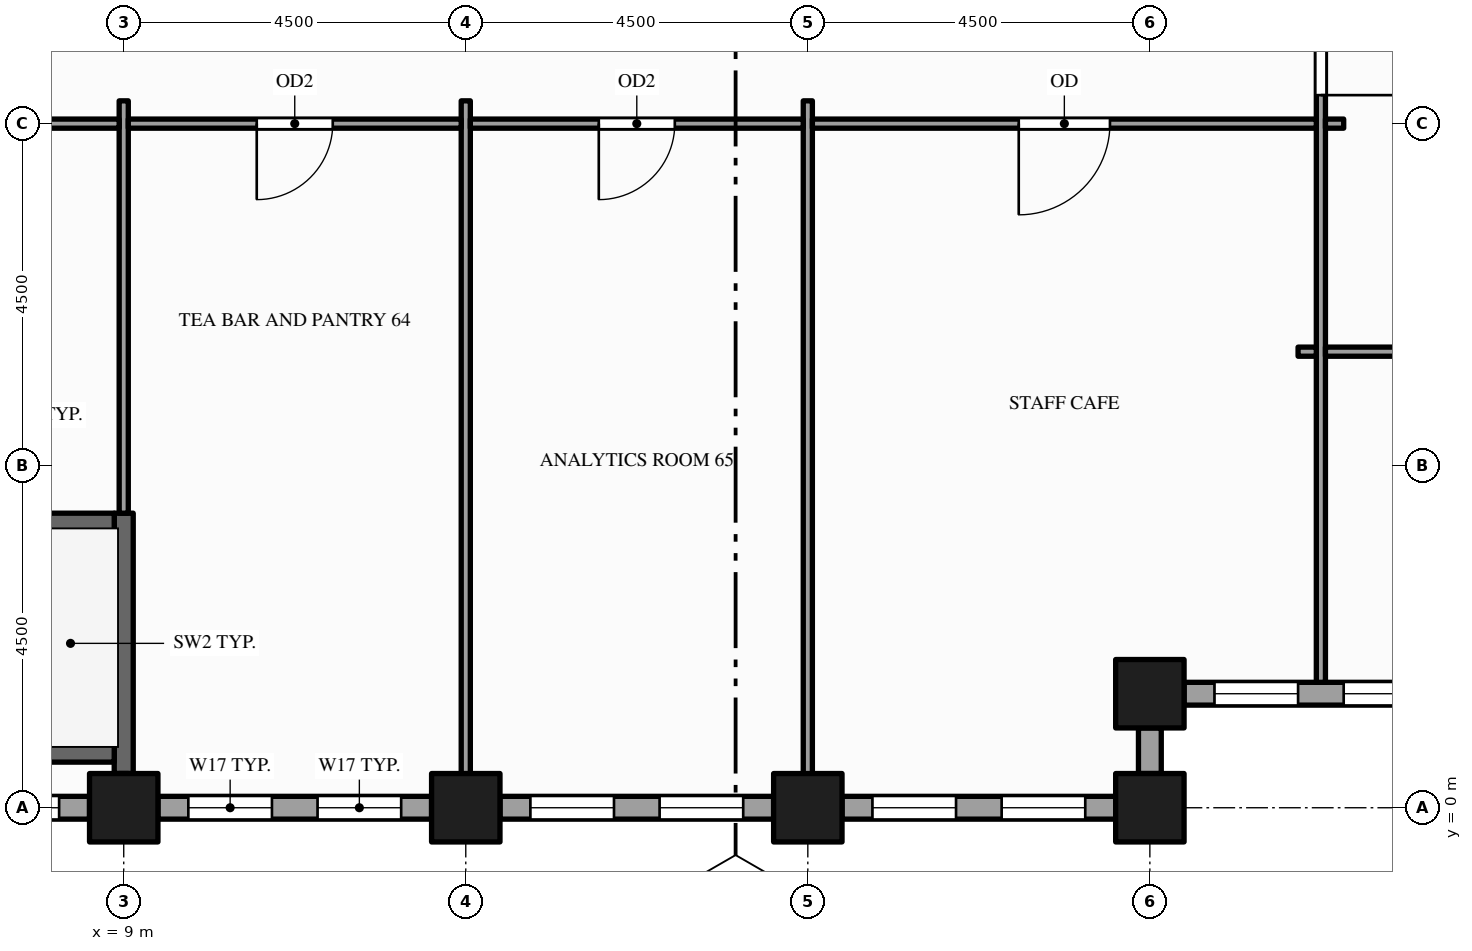
"""IFC4 building model, lengths in metres.
Left out: names, types, materials, properties, quantities, classifications, styles, units other than length and angle.
Written with IfcOpenShell. Run it as: python <this file> out.ifc"""

import sys

from ifc_helpers import new_model, si_unit, direction, frame, frame_2d, origin, origin_2d, place, context, subcontext, project, spatial, rectangle, hollow_rectangle, extrude, element, fill, save


model = new_model("IFC4")
c1 = context("Model", 3, precision=1e-05, world=origin(), true_north=direction((0.0, 1.0)))
c2 = subcontext(c1, "Body", "Model", "MODEL_VIEW")
j1 = project(units=[si_unit("LENGTHUNIT", "METRE"), si_unit("PLANEANGLEUNIT", "RADIAN")], contexts=[c1])
p1 = place(None, origin())
s1 = spatial("IfcSite", under=j1, at=p1, CompositionType="ELEMENT")
p2 = place(p1, origin())
s2 = spatial("IfcBuilding", under=s1, at=p2, CompositionType="ELEMENT")
p3 = place(p2, frame((0.0, 0.0, 159.0)))
s3 = spatial("IfcBuildingStorey", under=s2, at=p3, CompositionType="ELEMENT", Elevation=159.0)
for number, where, z_axis, x_axis in (
    (1, (9.0, 0.0, -0.15), (0.0, 0.0, 1.0), (1.0, 0.0, 0.0)),
    (2, (13.5, 0.0, -0.15), (0.0, 0.0, 1.0), (1.0, 0.0, 0.0)),
    (3, (18.0, 0.0, -0.15), (0.0, 0.0, 1.0), (1.0, 0.0, 0.0)),
    (4, (22.5, 0.0, -0.15), (0.0, 0.0, 1.0), (1.0, 0.0, 0.0)),
    (5, (22.5, 1.5, -0.15), (0.0, 0.0, 1.0), (1.0, 0.0, 0.0)),
):
    element("IfcColumn", number, at=place(p3, frame(where, z_axis=z_axis, x_axis=x_axis)), inside=s3, PredefinedType="COLUMN", context=c2, shape_type="SweptSolid", body=[
        extrude(hollow_rectangle(XDim=0.9, YDim=0.9, WallThickness=0.045, at=origin_2d()), origin(), (0.0, 0.0, 1.0), 4.0),
    ])
p4 = place(p3, frame((4.95, 0.0, 0.0), z_axis=(0.0, 0.0, 1.0), x_axis=(1.0, 0.0, 0.0)))
e6 = element("IfcWall", 6, at=p4, inside=s3, PredefinedType="STANDARD", context=c2, shape_type="SweptSolid", body=[
    extrude(rectangle(XDim=3.6, YDim=0.3, at=frame_2d((1.8, 0.0))), origin(), (0.0, 0.0, 1.0), 3.149),
])
p5 = place(p4, frame((0.4, 0.0, 0.9)))
e7 = element("IfcOpeningElement", 7, at=p5, cuts=e6, PredefinedType="OPENING", context=c2, shape_type="SweptSolid", body=[
    extrude(rectangle(XDim=1.1, YDim=2.0, at=frame_2d((0.55, 1.0))), frame((0.0, 0.16, 0.0), z_axis=(0.0, -1.0, 0.0), x_axis=(1.0, 0.0, 0.0)), (0.0, 0.0, 1.0), 0.32),
])
p6 = place(p4, frame((2.1, 0.0, 0.9)))
e8 = element("IfcOpeningElement", 8, at=p6, cuts=e6, PredefinedType="OPENING", context=c2, shape_type="SweptSolid", body=[
    extrude(rectangle(XDim=1.1, YDim=2.0, at=frame_2d((0.55, 1.0))), frame((0.0, 0.16, 0.0), z_axis=(0.0, -1.0, 0.0), x_axis=(1.0, 0.0, 0.0)), (0.0, 0.0, 1.0), 0.32),
])
p7 = place(p3, frame((9.45, 0.0, 0.0), z_axis=(0.0, 0.0, 1.0), x_axis=(1.0, 0.0, 0.0)))
e9 = element("IfcWall", 9, at=p7, inside=s3, PredefinedType="STANDARD", context=c2, shape_type="SweptSolid", body=[
    extrude(rectangle(XDim=3.6, YDim=0.3, at=frame_2d((1.8, 0.0))), origin(), (0.0, 0.0, 1.0), 2.87),
])
p8 = place(p7, frame((0.4, 0.0, 0.9)))
e10 = element("IfcOpeningElement", 10, at=p8, cuts=e9, PredefinedType="OPENING", context=c2, shape_type="SweptSolid", body=[
    extrude(rectangle(XDim=1.1, YDim=1.75, at=frame_2d((0.55, 0.875))), frame((0.0, 0.16, 0.0), z_axis=(0.0, -1.0, 0.0), x_axis=(1.0, 0.0, 0.0)), (0.0, 0.0, 1.0), 0.32),
])
p9 = place(p7, frame((2.1, 0.0, 0.9)))
e11 = element("IfcOpeningElement", 11, at=p9, cuts=e9, PredefinedType="OPENING", context=c2, shape_type="SweptSolid", body=[
    extrude(rectangle(XDim=1.1, YDim=1.75, at=frame_2d((0.55, 0.875))), frame((0.0, 0.16, 0.0), z_axis=(0.0, -1.0, 0.0), x_axis=(1.0, 0.0, 0.0)), (0.0, 0.0, 1.0), 0.32),
])
p10 = place(p3, frame((13.95, 0.0, 0.0), z_axis=(0.0, 0.0, 1.0), x_axis=(1.0, 0.0, 0.0)))
e12 = element("IfcWall", 12, at=p10, inside=s3, PredefinedType="STANDARD", context=c2, shape_type="SweptSolid", body=[
    extrude(rectangle(XDim=3.6, YDim=0.3, at=frame_2d((1.8, 0.0))), origin(), (0.0, 0.0, 1.0), 2.87),
])
p11 = place(p10, frame((0.4, 0.0, 0.9)))
e13 = element("IfcOpeningElement", 13, at=p11, cuts=e12, PredefinedType="OPENING", context=c2, shape_type="SweptSolid", body=[
    extrude(rectangle(XDim=1.1, YDim=1.75, at=frame_2d((0.55, 0.875))), frame((0.0, 0.16, 0.0), z_axis=(0.0, -1.0, 0.0), x_axis=(1.0, 0.0, 0.0)), (0.0, 0.0, 1.0), 0.32),
])
p12 = place(p10, frame((2.1, 0.0, 0.9)))
e14 = element("IfcOpeningElement", 14, at=p12, cuts=e12, PredefinedType="OPENING", context=c2, shape_type="SweptSolid", body=[
    extrude(rectangle(XDim=1.1, YDim=1.75, at=frame_2d((0.55, 0.875))), frame((0.0, 0.16, 0.0), z_axis=(0.0, -1.0, 0.0), x_axis=(1.0, 0.0, 0.0)), (0.0, 0.0, 1.0), 0.32),
])
p13 = place(p3, frame((18.45, 0.0, 0.0), z_axis=(0.0, 0.0, 1.0), x_axis=(1.0, 0.0, 0.0)))
e15 = element("IfcWall", 15, at=p13, inside=s3, PredefinedType="STANDARD", context=c2, shape_type="SweptSolid", body=[
    extrude(rectangle(XDim=3.6, YDim=0.3, at=frame_2d((1.8, 0.0))), origin(), (0.0, 0.0, 1.0), 2.87),
])
p14 = place(p13, frame((0.4, 0.0, 0.9)))
e16 = element("IfcOpeningElement", 16, at=p14, cuts=e15, PredefinedType="OPENING", context=c2, shape_type="SweptSolid", body=[
    extrude(rectangle(XDim=1.1, YDim=1.75, at=frame_2d((0.55, 0.875))), frame((0.0, 0.16, 0.0), z_axis=(0.0, -1.0, 0.0), x_axis=(1.0, 0.0, 0.0)), (0.0, 0.0, 1.0), 0.32),
])
p15 = place(p13, frame((2.1, 0.0, 0.9)))
e17 = element("IfcOpeningElement", 17, at=p15, cuts=e15, PredefinedType="OPENING", context=c2, shape_type="SweptSolid", body=[
    extrude(rectangle(XDim=1.1, YDim=1.75, at=frame_2d((0.55, 0.875))), frame((0.0, 0.16, 0.0), z_axis=(0.0, -1.0, 0.0), x_axis=(1.0, 0.0, 0.0)), (0.0, 0.0, 1.0), 0.32),
])
p16 = place(p3, frame((22.5, 0.45, 0.0), z_axis=(0.0, 0.0, 1.0), x_axis=(0.0, 1.0, 0.0)))
e18 = element("IfcWall", 18, at=p16, inside=s3, PredefinedType="STANDARD", context=c2, shape_type="SweptSolid", body=[
    extrude(rectangle(XDim=0.6, YDim=0.3, at=frame_2d((0.3, 0.0))), origin(), (0.0, 0.0, 1.0), 3.149),
])
p17 = place(p3, frame((22.95, 1.5, 0.0), z_axis=(0.0, 0.0, 1.0), x_axis=(1.0, 0.0, 0.0)))
e19 = element("IfcWall", 19, at=p17, inside=s3, PredefinedType="STANDARD", context=c2, shape_type="SweptSolid", body=[
    extrude(rectangle(XDim=3.6, YDim=0.3, at=frame_2d((1.8, 0.0))), origin(), (0.0, 0.0, 1.0), 2.87),
])
p18 = place(p17, frame((0.4, 0.0, 0.9)))
e20 = element("IfcOpeningElement", 20, at=p18, cuts=e19, PredefinedType="OPENING", context=c2, shape_type="SweptSolid", body=[
    extrude(rectangle(XDim=1.1, YDim=1.75, at=frame_2d((0.55, 0.875))), frame((0.0, 0.16, 0.0), z_axis=(0.0, -1.0, 0.0), x_axis=(1.0, 0.0, 0.0)), (0.0, 0.0, 1.0), 0.32),
])
p19 = place(p17, frame((2.1, 0.0, 0.9)))
e21 = element("IfcOpeningElement", 21, at=p19, cuts=e19, PredefinedType="OPENING", context=c2, shape_type="SweptSolid", body=[
    extrude(rectangle(XDim=1.1, YDim=1.75, at=frame_2d((0.55, 0.875))), frame((0.0, 0.16, 0.0), z_axis=(0.0, -1.0, 0.0), x_axis=(1.0, 0.0, 0.0)), (0.0, 0.0, 1.0), 0.32),
])
p20 = place(p3, frame((9.0, 0.15, 0.0), z_axis=(0.0, 0.0, 1.0), x_axis=(0.0, 1.0, 0.0)))
e22 = element("IfcWall", 22, at=p20, inside=s3, PredefinedType="PARTITIONING", context=c2, shape_type="SweptSolid", body=[
    extrude(rectangle(XDim=0.3, YDim=0.12, at=frame_2d((0.15, 0.0))), origin(), (0.0, 0.0, 1.0), 3.85),
])
p21 = place(p3, frame((9.0, 0.45, 0.0), z_axis=(0.0, 0.0, 1.0), x_axis=(0.0, 1.0, 0.0)))
e23 = element("IfcWall", 23, at=p21, inside=s3, PredefinedType="SHEAR", context=c2, shape_type="SweptSolid", body=[
    extrude(rectangle(XDim=3.425, YDim=0.25, at=frame_2d((1.712, 0.0))), origin(), (0.0, 0.0, 1.0), 3.85),
])
p22 = place(p3, frame((9.0, 3.875, 0.0), z_axis=(0.0, 0.0, 1.0), x_axis=(0.0, 1.0, 0.0)))
e24 = element("IfcWall", 24, at=p22, inside=s3, PredefinedType="PARTITIONING", context=c2, shape_type="SweptSolid", body=[
    extrude(rectangle(XDim=5.425, YDim=0.12, at=frame_2d((2.712, 0.0))), origin(), (0.0, 0.0, 1.0), 2.87),
])
for number, where, z_axis, x_axis in (
    (25, (13.5, 0.15, 0.0), (0.0, 0.0, 1.0), (0.0, 1.0, 0.0)),
    (26, (18.0, 0.15, 0.0), (0.0, 0.0, 1.0), (0.0, 1.0, 0.0)),
):
    element("IfcWall", number, at=place(p3, frame(where, z_axis=z_axis, x_axis=x_axis)), inside=s3, PredefinedType="PARTITIONING", context=c2, shape_type="SweptSolid", body=[
        extrude(rectangle(XDim=9.15, YDim=0.12, at=frame_2d((4.575, 0.0))), origin(), (0.0, 0.0, 1.0), 2.87),
    ])
p23 = place(p3, frame((24.75, 1.65, 0.0), z_axis=(0.0, 0.0, 1.0), x_axis=(0.0, 1.0, 0.0)))
e27 = element("IfcWall", 27, at=p23, inside=s3, PredefinedType="PARTITIONING", context=c2, shape_type="SweptSolid", body=[
    extrude(rectangle(XDim=22.298, YDim=0.12, at=frame_2d((11.149, 0.0))), origin(), (0.0, 0.0, 1.0), 2.87),
])
p24 = place(p23, frame((7.725, 0.0, 0.0)))
e28 = element("IfcOpeningElement", 28, at=p24, cuts=e27, PredefinedType="OPENING", context=c2, shape_type="SweptSolid", body=[
    extrude(rectangle(XDim=1.5, YDim=2.1, at=frame_2d((0.75, 1.05))), frame((0.0, 0.07, 0.0), z_axis=(0.0, -1.0, 0.0), x_axis=(1.0, 0.0, 0.0)), (0.0, 0.0, 1.0), 0.14),
])
p25 = place(p23, frame((13.125, 0.0, 0.0)))
e29 = element("IfcOpeningElement", 29, at=p25, cuts=e27, PredefinedType="OPENING", context=c2, shape_type="SweptSolid", body=[
    extrude(rectangle(XDim=1.2, YDim=2.1, at=frame_2d((0.6, 1.05))), frame((0.0, 0.07, 0.0), z_axis=(0.0, -1.0, 0.0), x_axis=(1.0, 0.0, 0.0)), (0.0, 0.0, 1.0), 0.14),
])
p26 = place(p3, frame((0.85, 0.725, 0.0), z_axis=(0.0, 0.0, 1.0), x_axis=(1.0, 0.0, 0.0)))
e30 = element("IfcWall", 30, at=p26, inside=s3, PredefinedType="SHEAR", context=c2, shape_type="SweptSolid", body=[
    extrude(rectangle(XDim=8.025, YDim=0.25, at=frame_2d((4.012, 0.0))), origin(), (0.0, 0.0, 1.0), 3.85),
])
p27 = place(p3, frame((0.85, 3.75, 0.0), z_axis=(0.0, 0.0, 1.0), x_axis=(1.0, 0.0, 0.0)))
e31 = element("IfcWall", 31, at=p27, inside=s3, PredefinedType="SHEAR", context=c2, shape_type="SweptSolid", body=[
    extrude(rectangle(XDim=8.025, YDim=0.25, at=frame_2d((4.012, 0.0))), origin(), (0.0, 0.0, 1.0), 3.85),
])
p28 = place(p27, frame((0.15, 0.0, 0.0)))
e32 = element("IfcOpeningElement", 32, at=p28, cuts=e31, PredefinedType="OPENING", context=c2, shape_type="SweptSolid", body=[
    extrude(rectangle(XDim=1.1, YDim=2.1, at=frame_2d((0.55, 1.05))), frame((0.0, 0.135, 0.0), z_axis=(0.0, -1.0, 0.0), x_axis=(1.0, 0.0, 0.0)), (0.0, 0.0, 1.0), 0.27),
])
p29 = place(p3, frame((24.45, 6.0, 0.0), z_axis=(0.0, 0.0, 1.0), x_axis=(1.0, 0.0, 0.0)))
e33 = element("IfcWall", 33, at=p29, inside=s3, PredefinedType="PARTITIONING", context=c2, shape_type="SweptSolid", body=[
    extrude(rectangle(XDim=0.24, YDim=0.12, at=frame_2d((0.12, 0.0))), origin(), (0.0, 0.0, 1.0), 2.87),
])
p30 = place(p3, frame((24.81, 6.0, 0.0), z_axis=(0.0, 0.0, 1.0), x_axis=(1.0, 0.0, 0.0)))
e34 = element("IfcWall", 34, at=p30, inside=s3, PredefinedType="PARTITIONING", context=c2, shape_type="SweptSolid", body=[
    extrude(rectangle(XDim=2.13, YDim=0.12, at=frame_2d((1.065, 0.0))), origin(), (0.0, 0.0, 1.0), 2.87),
])
p31 = place(p3, frame((0.15, 9.0, 0.0), z_axis=(0.0, 0.0, 1.0), x_axis=(1.0, 0.0, 0.0)))
e35 = element("IfcWall", 35, at=p31, inside=s3, PredefinedType="PARTITIONING", context=c2, shape_type="SweptSolid", body=[
    extrude(rectangle(XDim=8.79, YDim=0.12, at=frame_2d((4.395, 0.0))), origin(), (0.0, 0.0, 1.0), 2.87),
])
p32 = place(p31, frame((3.805, 0.0, 0.0)))
e36 = element("IfcOpeningElement", 36, at=p32, cuts=e35, PredefinedType="OPENING", context=c2, shape_type="SweptSolid", body=[
    extrude(rectangle(XDim=1.2, YDim=2.1, at=frame_2d((0.6, 1.05))), frame((0.0, 0.07, 0.0), z_axis=(0.0, -1.0, 0.0), x_axis=(1.0, 0.0, 0.0)), (0.0, 0.0, 1.0), 0.14),
])
p33 = place(p3, frame((9.06, 9.0, 0.0), z_axis=(0.0, 0.0, 1.0), x_axis=(1.0, 0.0, 0.0)))
e37 = element("IfcWall", 37, at=p33, inside=s3, PredefinedType="PARTITIONING", context=c2, shape_type="SweptSolid", body=[
    extrude(rectangle(XDim=4.38, YDim=0.12, at=frame_2d((2.19, 0.0))), origin(), (0.0, 0.0, 1.0), 2.87),
])
p34 = place(p33, frame((1.69, 0.0, 0.0)))
e38 = element("IfcOpeningElement", 38, at=p34, cuts=e37, PredefinedType="OPENING", context=c2, shape_type="SweptSolid", body=[
    extrude(rectangle(XDim=1.0, YDim=2.1, at=frame_2d((0.5, 1.05))), frame((0.0, 0.07, 0.0), z_axis=(0.0, -1.0, 0.0), x_axis=(1.0, 0.0, 0.0)), (0.0, 0.0, 1.0), 0.14),
])
p35 = place(p3, frame((13.56, 9.0, 0.0), z_axis=(0.0, 0.0, 1.0), x_axis=(1.0, 0.0, 0.0)))
e39 = element("IfcWall", 39, at=p35, inside=s3, PredefinedType="PARTITIONING", context=c2, shape_type="SweptSolid", body=[
    extrude(rectangle(XDim=4.38, YDim=0.12, at=frame_2d((2.19, 0.0))), origin(), (0.0, 0.0, 1.0), 2.87),
])
p36 = place(p35, frame((1.69, 0.0, 0.0)))
e40 = element("IfcOpeningElement", 40, at=p36, cuts=e39, PredefinedType="OPENING", context=c2, shape_type="SweptSolid", body=[
    extrude(rectangle(XDim=1.0, YDim=2.1, at=frame_2d((0.5, 1.05))), frame((0.0, 0.07, 0.0), z_axis=(0.0, -1.0, 0.0), x_axis=(1.0, 0.0, 0.0)), (0.0, 0.0, 1.0), 0.14),
])
p37 = place(p3, frame((18.06, 9.0, 0.0), z_axis=(0.0, 0.0, 1.0), x_axis=(1.0, 0.0, 0.0)))
e41 = element("IfcWall", 41, at=p37, inside=s3, PredefinedType="PARTITIONING", context=c2, shape_type="SweptSolid", body=[
    extrude(rectangle(XDim=6.63, YDim=0.12, at=frame_2d((3.315, 0.0))), origin(), (0.0, 0.0, 1.0), 2.87),
])
p38 = place(p37, frame((2.715, 0.0, 0.0)))
e42 = element("IfcOpeningElement", 42, at=p38, cuts=e41, PredefinedType="OPENING", context=c2, shape_type="SweptSolid", body=[
    extrude(rectangle(XDim=1.2, YDim=2.1, at=frame_2d((0.6, 1.05))), frame((0.0, 0.07, 0.0), z_axis=(0.0, -1.0, 0.0), x_axis=(1.0, 0.0, 0.0)), (0.0, 0.0, 1.0), 0.14),
])
p39 = place(p3, frame((24.81, 9.0, 0.0), z_axis=(0.0, 0.0, 1.0), x_axis=(1.0, 0.0, 0.0)))
e43 = element("IfcWall", 43, at=p39, inside=s3, PredefinedType="PARTITIONING", context=c2, shape_type="SweptSolid", body=[
    extrude(rectangle(XDim=0.24, YDim=0.12, at=frame_2d((0.12, 0.0))), origin(), (0.0, 0.0, 1.0), 2.87),
])
p40 = place(p6, origin())
e44 = element("IfcWindow", 44, at=p40, inside=s3, PartitioningType="SINGLE_PANEL", PredefinedType="WINDOW", context=c2, shape_type="SweptSolid", body=[
    extrude(rectangle(XDim=1.1, YDim=2.0, at=frame_2d((0.55, 1.0))), frame((0.0, 0.03, 0.0), z_axis=(0.0, -1.0, 0.0), x_axis=(1.0, 0.0, 0.0)), (0.0, 0.0, 1.0), 0.06),
])
fill(e8, e44)
p41 = place(p8, origin())
e45 = element("IfcWindow", 45, at=p41, inside=s3, PartitioningType="SINGLE_PANEL", PredefinedType="WINDOW", context=c2, shape_type="SweptSolid", body=[
    extrude(rectangle(XDim=1.1, YDim=1.75, at=frame_2d((0.55, 0.875))), frame((0.0, 0.03, 0.0), z_axis=(0.0, -1.0, 0.0), x_axis=(1.0, 0.0, 0.0)), (0.0, 0.0, 1.0), 0.06),
])
fill(e10, e45)
p42 = place(p9, origin())
e46 = element("IfcWindow", 46, at=p42, inside=s3, PartitioningType="SINGLE_PANEL", PredefinedType="WINDOW", context=c2, shape_type="SweptSolid", body=[
    extrude(rectangle(XDim=1.1, YDim=1.75, at=frame_2d((0.55, 0.875))), frame((0.0, 0.03, 0.0), z_axis=(0.0, -1.0, 0.0), x_axis=(1.0, 0.0, 0.0)), (0.0, 0.0, 1.0), 0.06),
])
fill(e11, e46)
p43 = place(p11, origin())
e47 = element("IfcWindow", 47, at=p43, inside=s3, PartitioningType="SINGLE_PANEL", PredefinedType="WINDOW", context=c2, shape_type="SweptSolid", body=[
    extrude(rectangle(XDim=1.1, YDim=1.75, at=frame_2d((0.55, 0.875))), frame((0.0, 0.03, 0.0), z_axis=(0.0, -1.0, 0.0), x_axis=(1.0, 0.0, 0.0)), (0.0, 0.0, 1.0), 0.06),
])
fill(e13, e47)
p44 = place(p12, origin())
e48 = element("IfcWindow", 48, at=p44, inside=s3, PartitioningType="SINGLE_PANEL", PredefinedType="WINDOW", context=c2, shape_type="SweptSolid", body=[
    extrude(rectangle(XDim=1.1, YDim=1.75, at=frame_2d((0.55, 0.875))), frame((0.0, 0.03, 0.0), z_axis=(0.0, -1.0, 0.0), x_axis=(1.0, 0.0, 0.0)), (0.0, 0.0, 1.0), 0.06),
])
fill(e14, e48)
p45 = place(p14, origin())
e49 = element("IfcWindow", 49, at=p45, inside=s3, PartitioningType="SINGLE_PANEL", PredefinedType="WINDOW", context=c2, shape_type="SweptSolid", body=[
    extrude(rectangle(XDim=1.1, YDim=1.75, at=frame_2d((0.55, 0.875))), frame((0.0, 0.03, 0.0), z_axis=(0.0, -1.0, 0.0), x_axis=(1.0, 0.0, 0.0)), (0.0, 0.0, 1.0), 0.06),
])
fill(e16, e49)
p46 = place(p15, origin())
e50 = element("IfcWindow", 50, at=p46, inside=s3, PartitioningType="SINGLE_PANEL", PredefinedType="WINDOW", context=c2, shape_type="SweptSolid", body=[
    extrude(rectangle(XDim=1.1, YDim=1.75, at=frame_2d((0.55, 0.875))), frame((0.0, 0.03, 0.0), z_axis=(0.0, -1.0, 0.0), x_axis=(1.0, 0.0, 0.0)), (0.0, 0.0, 1.0), 0.06),
])
fill(e17, e50)
p47 = place(p18, origin())
e51 = element("IfcWindow", 51, at=p47, inside=s3, PartitioningType="SINGLE_PANEL", PredefinedType="WINDOW", context=c2, shape_type="SweptSolid", body=[
    extrude(rectangle(XDim=1.1, YDim=1.75, at=frame_2d((0.55, 0.875))), frame((0.0, 0.03, 0.0), z_axis=(0.0, -1.0, 0.0), x_axis=(1.0, 0.0, 0.0)), (0.0, 0.0, 1.0), 0.06),
])
fill(e20, e51)
p48 = place(p19, origin())
e52 = element("IfcWindow", 52, at=p48, inside=s3, PartitioningType="SINGLE_PANEL", PredefinedType="WINDOW", context=c2, shape_type="SweptSolid", body=[
    extrude(rectangle(XDim=1.1, YDim=1.75, at=frame_2d((0.55, 0.875))), frame((0.0, 0.03, 0.0), z_axis=(0.0, -1.0, 0.0), x_axis=(1.0, 0.0, 0.0)), (0.0, 0.0, 1.0), 0.06),
])
fill(e21, e52)
p49 = place(p24, origin())
e53 = element("IfcDoor", 53, at=p49, inside=s3, OperationType="SINGLE_SWING_LEFT", PredefinedType="DOOR", context=c2, shape_type="SweptSolid", body=[
    extrude(rectangle(XDim=1.5, YDim=2.1, at=frame_2d((0.75, 1.05))), frame((0.0, 0.025, 0.0), z_axis=(0.0, -1.0, 0.0), x_axis=(1.0, 0.0, 0.0)), (0.0, 0.0, 1.0), 0.05),
])
fill(e28, e53)
p50 = place(p34, origin())
e54 = element("IfcDoor", 54, at=p50, inside=s3, OperationType="SINGLE_SWING_LEFT", PredefinedType="DOOR", context=c2, shape_type="SweptSolid", body=[
    extrude(rectangle(XDim=1.0, YDim=2.1, at=frame_2d((0.5, 1.05))), frame((0.0, 0.025, 0.0), z_axis=(0.0, -1.0, 0.0), x_axis=(1.0, 0.0, 0.0)), (0.0, 0.0, 1.0), 0.05),
])
fill(e38, e54)
p51 = place(p36, origin())
e55 = element("IfcDoor", 55, at=p51, inside=s3, OperationType="SINGLE_SWING_LEFT", PredefinedType="DOOR", context=c2, shape_type="SweptSolid", body=[
    extrude(rectangle(XDim=1.0, YDim=2.1, at=frame_2d((0.5, 1.05))), frame((0.0, 0.025, 0.0), z_axis=(0.0, -1.0, 0.0), x_axis=(1.0, 0.0, 0.0)), (0.0, 0.0, 1.0), 0.05),
])
fill(e40, e55)
p52 = place(p38, origin())
e56 = element("IfcDoor", 56, at=p52, inside=s3, OperationType="SINGLE_SWING_LEFT", PredefinedType="DOOR", context=c2, shape_type="SweptSolid", body=[
    extrude(rectangle(XDim=1.2, YDim=2.1, at=frame_2d((0.6, 1.05))), frame((0.0, 0.025, 0.0), z_axis=(0.0, -1.0, 0.0), x_axis=(1.0, 0.0, 0.0)), (0.0, 0.0, 1.0), 0.05),
])
fill(e42, e56)
save(model, sys.argv[1])
